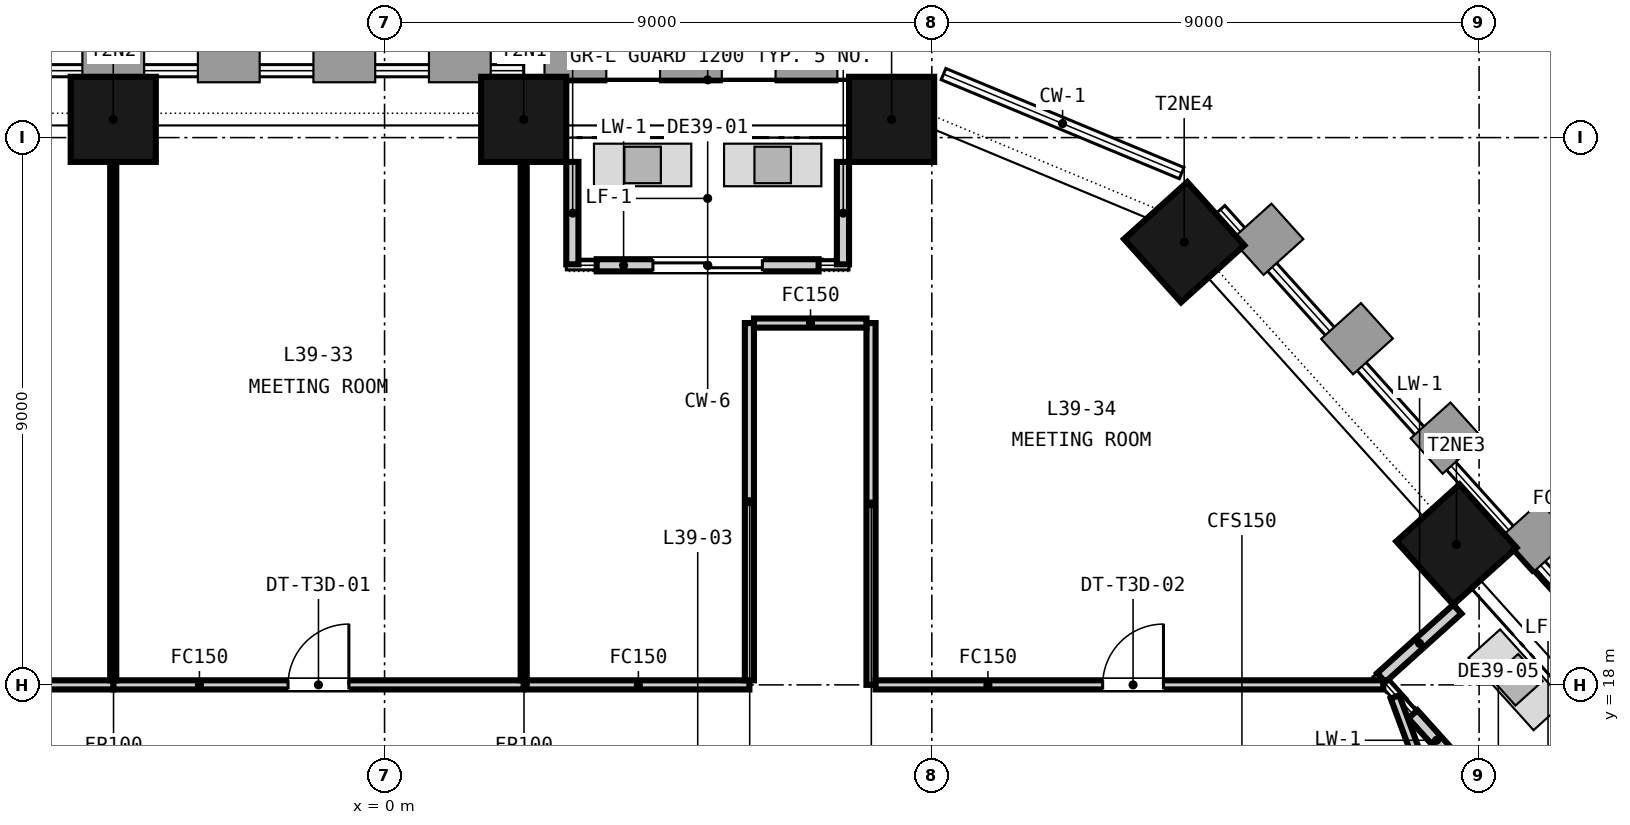
"""IFC4 building model, lengths in metres.
Left out: names, types, materials, properties, quantities, classifications, styles, units other than length and angle.
Written with IfcOpenShell. Run it as: python <this file> out.ifc"""

import sys

from ifc_helpers import new_model, si_unit, direction, frame, frame_2d, origin, origin_2d, place, context, subcontext, project, spatial, rectangle, extrude, element, fill, save


model = new_model("IFC4")
c1 = context("Model", 3, precision=1e-05, world=origin(), true_north=direction((0.0, 1.0)))
c2 = subcontext(c1, "Body", "Model", "MODEL_VIEW")
j1 = project(units=[si_unit("LENGTHUNIT", "METRE"), si_unit("PLANEANGLEUNIT", "RADIAN")], contexts=[c1])
p1 = place(None, origin())
s1 = spatial("IfcSite", under=j1, at=p1, CompositionType="ELEMENT")
p2 = place(p1, origin())
s2 = spatial("IfcBuilding", under=s1, at=p2, CompositionType="ELEMENT")
p3 = place(p2, frame((0.0, 0.0, 159.0)))
s3 = spatial("IfcBuildingStorey", under=s2, at=p3, CompositionType="ELEMENT", Elevation=159.0)
for number, where, z_axis, x_axis in (
    (1, (8.339, 27.3, -0.15), (0.0, 0.0, 1.0), (-1.0, 0.0, 0.0)),
    (2, (2.288, 27.3, -0.15), (0.0, 0.0, 1.0), (-1.0, 0.0, 0.0)),
    (3, (-4.462, 27.3, -0.15), (0.0, 0.0, 1.0), (-1.0, 0.0, 0.0)),
    (4, (17.627, 20.308, -0.15), (0.0, 0.0, 1.0), (-0.669, 0.743, 0.0)),
    (5, (13.15, 25.28, -0.15), (0.0, 0.0, 1.0), (-0.669, 0.743, 0.0)),
):
    element("IfcColumn", number, at=place(p3, frame(where, z_axis=z_axis, x_axis=x_axis)), inside=s3, PredefinedType="COLUMN", context=c2, shape_type="SweptSolid", body=[
        extrude(rectangle(XDim=1.4, YDim=1.4, at=origin_2d()), origin(), (0.0, 0.0, 1.0), 3.65),
    ])
p4 = place(p3, frame((7.139, 24.9, 0.0), z_axis=(0.0, 0.0, 1.0), x_axis=(-1.0, 0.0, 0.0)))
e6 = element("IfcWall", 6, at=p4, inside=s3, PredefinedType="SOLIDWALL", context=c2, shape_type="SweptSolid", body=[
    extrude(rectangle(XDim=3.65, YDim=0.2, at=frame_2d((1.825, 0.0))), origin(), (0.0, 0.0, 1.0), 3.05),
])
p5 = place(p4, frame((0.925, 0.0, 0.0)))
e7 = element("IfcOpeningElement", 7, at=p5, cuts=e6, PredefinedType="OPENING", context=c2, shape_type="SweptSolid", body=[
    extrude(rectangle(XDim=1.8, YDim=2.4, at=frame_2d((0.9, 1.2))), frame((0.0, 0.11, 0.0), z_axis=(0.0, -1.0, 0.0), x_axis=(1.0, 0.0, 0.0)), (0.0, 0.0, 1.0), 0.22),
])
for number, where, z_axis, x_axis in (
    (8, (7.539, 26.6, 0.0), (0.0, 0.0, 1.0), (0.0, -1.0, 0.0)),
    (9, (3.088, 26.6, 0.0), (0.0, 0.0, 1.0), (0.0, -1.0, 0.0)),
):
    element("IfcWall", number, at=place(p3, frame(where, z_axis=z_axis, x_axis=x_axis)), inside=s3, PredefinedType="SOLIDWALL", context=c2, shape_type="SweptSolid", body=[
        extrude(rectangle(XDim=1.684, YDim=0.2, at=frame_2d((0.842, 0.0))), origin(), (0.0, 0.0, 1.0), 3.05),
    ])
p6 = place(p3, frame((19.721, 14.395, 0.0), z_axis=(0.0, 0.0, 1.0), x_axis=(-0.669170241733, 0.743109135712, 0.0)))
e10 = element("IfcWall", 10, at=p6, inside=s3, PredefinedType="SOLIDWALL", context=c2, shape_type="SweptSolid", body=[
    extrude(rectangle(XDim=4.2, YDim=0.2, at=frame_2d((2.1, 0.0))), origin(), (0.0, 0.0, 1.0), 2.897),
])
p7 = place(p6, frame((1.2, 0.0, 0.0)))
e11 = element("IfcOpeningElement", 11, at=p7, cuts=e10, PredefinedType="OPENING", context=c2, shape_type="SweptSolid", body=[
    extrude(rectangle(XDim=1.8, YDim=2.4, at=frame_2d((0.9, 1.2))), frame((0.0, 0.11, 0.0), z_axis=(0.0, -1.0, 0.0), x_axis=(1.0, 0.0, 0.0)), (0.0, 0.0, 1.0), 0.22),
])
p8 = place(p3, frame((17.642, 19.245, 0.0), z_axis=(0.0, 0.0, 1.0), x_axis=(-0.743106699699, -0.6691729469, 0.0)))
e12 = element("IfcWall", 12, at=p8, inside=s3, PredefinedType="SOLIDWALL", context=c2, shape_type="SweptSolid", body=[
    extrude(rectangle(XDim=1.684, YDim=0.2, at=frame_2d((0.842, 0.0))), origin(), (0.0, 0.0, 1.0), 3.05),
])
p9 = place(p3, frame((8.0, 23.95, 0.0), z_axis=(0.0, 0.0, 1.0), x_axis=(0.0, -1.0, 0.0)))
e13 = element("IfcWall", 13, at=p9, inside=s3, PredefinedType="PARTITIONING", context=c2, shape_type="SweptSolid", body=[
    extrude(rectangle(XDim=5.95, YDim=0.15, at=frame_2d((2.975, 0.0))), origin(), (0.0, 0.0, 1.0), 2.741),
])
p10 = place(p3, frame((-4.462, 18.0, 0.0), z_axis=(0.0, 0.0, 1.0), x_axis=(1.0, 0.0, 0.0)))
e14 = element("IfcWall", 14, at=p10, inside=s3, PredefinedType="PARTITIONING", context=c2, shape_type="SweptSolid", body=[
    extrude(rectangle(XDim=6.75, YDim=0.15, at=frame_2d((3.375, 0.0))), origin(), (0.0, 0.0, 1.0), 2.741),
])
p11 = place(p10, frame((2.875, 0.0, 0.0)))
e15 = element("IfcOpeningElement", 15, at=p11, cuts=e14, PredefinedType="OPENING", context=c2, shape_type="SweptSolid", body=[
    extrude(rectangle(XDim=1.0, YDim=2.1, at=frame_2d((0.5, 1.05))), frame((0.0, 0.085, 0.0), z_axis=(0.0, -1.0, 0.0), x_axis=(1.0, 0.0, 0.0)), (0.0, 0.0, 1.0), 0.17),
])
p12 = place(p3, frame((2.288, 18.075, 0.0), z_axis=(0.0, 0.0, 1.0), x_axis=(0.0, 1.0, 0.0)))
e16 = element("IfcWall", 16, at=p12, inside=s3, PredefinedType="PARTITIONING", context=c2, shape_type="SweptSolid", body=[
    extrude(rectangle(XDim=9.325, YDim=0.1, at=frame_2d((4.663, 0.0))), origin(), (0.0, 0.0, 1.0), 2.741),
])
p13 = place(p3, frame((2.338, 18.0, 0.0), z_axis=(0.0, 0.0, 1.0), x_axis=(1.0, 0.0, 0.0)))
e17 = element("IfcWall", 17, at=p13, inside=s3, PredefinedType="PARTITIONING", context=c2, shape_type="SweptSolid", body=[
    extrude(rectangle(XDim=3.662, YDim=0.15, at=frame_2d((1.831, 0.0))), origin(), (0.0, 0.0, 1.0), 2.741),
])
p14 = place(p3, frame((6.0, 18.075, 0.0), z_axis=(0.0, 0.0, 1.0), x_axis=(0.0, 1.0, 0.0)))
e18 = element("IfcWall", 18, at=p14, inside=s3, PredefinedType="PARTITIONING", context=c2, shape_type="SweptSolid", body=[
    extrude(rectangle(XDim=5.875, YDim=0.15, at=frame_2d((2.938, 0.0))), origin(), (0.0, 0.0, 1.0), 2.741),
])
p15 = place(p3, frame((6.075, 23.95, 0.0), z_axis=(0.0, 0.0, 1.0), x_axis=(1.0, 0.0, 0.0)))
e19 = element("IfcWall", 19, at=p15, inside=s3, PredefinedType="PARTITIONING", context=c2, shape_type="SweptSolid", body=[
    extrude(rectangle(XDim=1.85, YDim=0.15, at=frame_2d((0.925, 0.0))), origin(), (0.0, 0.0, 1.0), 2.741),
])
p16 = place(p3, frame((8.075, 18.0, 0.0), z_axis=(0.0, 0.0, 1.0), x_axis=(1.0, 0.0, 0.0)))
e20 = element("IfcWall", 20, at=p16, inside=s3, PredefinedType="PARTITIONING", context=c2, shape_type="SweptSolid", body=[
    extrude(rectangle(XDim=8.349, YDim=0.15, at=frame_2d((4.175, 0.0))), origin(), (0.0, 0.0, 1.0), 2.741),
])
p17 = place(p16, frame((3.735, 0.0, 0.0)))
e21 = element("IfcOpeningElement", 21, at=p17, cuts=e20, PredefinedType="OPENING", context=c2, shape_type="SweptSolid", body=[
    extrude(rectangle(XDim=1.0, YDim=2.1, at=frame_2d((0.5, 1.05))), frame((0.0, 0.085, 0.0), z_axis=(0.0, -1.0, 0.0), x_axis=(1.0, 0.0, 0.0)), (0.0, 0.0, 1.0), 0.17),
])
p18 = place(p3, frame((16.617, 17.802, 0.0), z_axis=(0.0, 0.0, 1.0), x_axis=(0.347221966082, -0.937782973971, 0.0)))
e22 = element("IfcWall", 22, at=p18, inside=s3, PredefinedType="PARTITIONING", context=c2, shape_type="SweptSolid", body=[
    extrude(rectangle(XDim=3.185, YDim=0.15, at=frame_2d((1.592, 0.0))), origin(), (0.0, 0.0, 1.0), 2.741),
])
p19 = place(p3, frame((-16.469, 18.0, 0.0), z_axis=(0.0, 0.0, 1.0), x_axis=(1.0, 0.0, 0.0)))
e23 = element("IfcWall", 23, at=p19, inside=s3, PredefinedType="PARTITIONING", context=c2, shape_type="SweptSolid", body=[
    extrude(rectangle(XDim=12.007, YDim=0.15, at=frame_2d((6.003, 0.0))), origin(), (0.0, 0.0, 1.0), 2.741),
])
p20 = place(p19, frame((5.104, 0.0, 0.0)))
e24 = element("IfcOpeningElement", 24, at=p20, cuts=e23, PredefinedType="OPENING", context=c2, shape_type="SweptSolid", body=[
    extrude(rectangle(XDim=1.8, YDim=2.1, at=frame_2d((0.9, 1.05))), frame((0.0, 0.085, 0.0), z_axis=(0.0, -1.0, 0.0), x_axis=(1.0, 0.0, 0.0)), (0.0, 0.0, 1.0), 0.17),
])
p21 = place(p3, frame((-4.462, 18.075, 0.0), z_axis=(0.0, 0.0, 1.0), x_axis=(0.0, 1.0, 0.0)))
e25 = element("IfcWall", 25, at=p21, inside=s3, PredefinedType="PARTITIONING", context=c2, shape_type="SweptSolid", body=[
    extrude(rectangle(XDim=9.325, YDim=0.1, at=frame_2d((4.663, 0.0))), origin(), (0.0, 0.0, 1.0), 2.741),
])
p22 = place(p5, origin())
e26 = element("IfcDoor", 26, at=p22, inside=s3, OperationType="SINGLE_SWING_LEFT", PredefinedType="DOOR", context=c2, shape_type="SweptSolid", body=[
    extrude(rectangle(XDim=1.8, YDim=2.4, at=frame_2d((0.9, 1.2))), frame((0.0, 0.025, 0.0), z_axis=(0.0, -1.0, 0.0), x_axis=(1.0, 0.0, 0.0)), (0.0, 0.0, 1.0), 0.05),
])
fill(e7, e26)
p23 = place(p11, origin())
e27 = element("IfcDoor", 27, at=p23, inside=s3, OperationType="SINGLE_SWING_RIGHT", PredefinedType="DOOR", context=c2, shape_type="SweptSolid", body=[
    extrude(rectangle(XDim=1.0, YDim=2.1, at=frame_2d((0.5, 1.05))), frame((0.0, 0.025, 0.0), z_axis=(0.0, -1.0, 0.0), x_axis=(1.0, 0.0, 0.0)), (0.0, 0.0, 1.0), 0.05),
])
fill(e15, e27)
p24 = place(p17, origin())
e28 = element("IfcDoor", 28, at=p24, inside=s3, OperationType="SINGLE_SWING_RIGHT", PredefinedType="DOOR", context=c2, shape_type="SweptSolid", body=[
    extrude(rectangle(XDim=1.0, YDim=2.1, at=frame_2d((0.5, 1.05))), frame((0.0, 0.025, 0.0), z_axis=(0.0, -1.0, 0.0), x_axis=(1.0, 0.0, 0.0)), (0.0, 0.0, 1.0), 0.05),
])
fill(e21, e28)
save(model, sys.argv[1])
